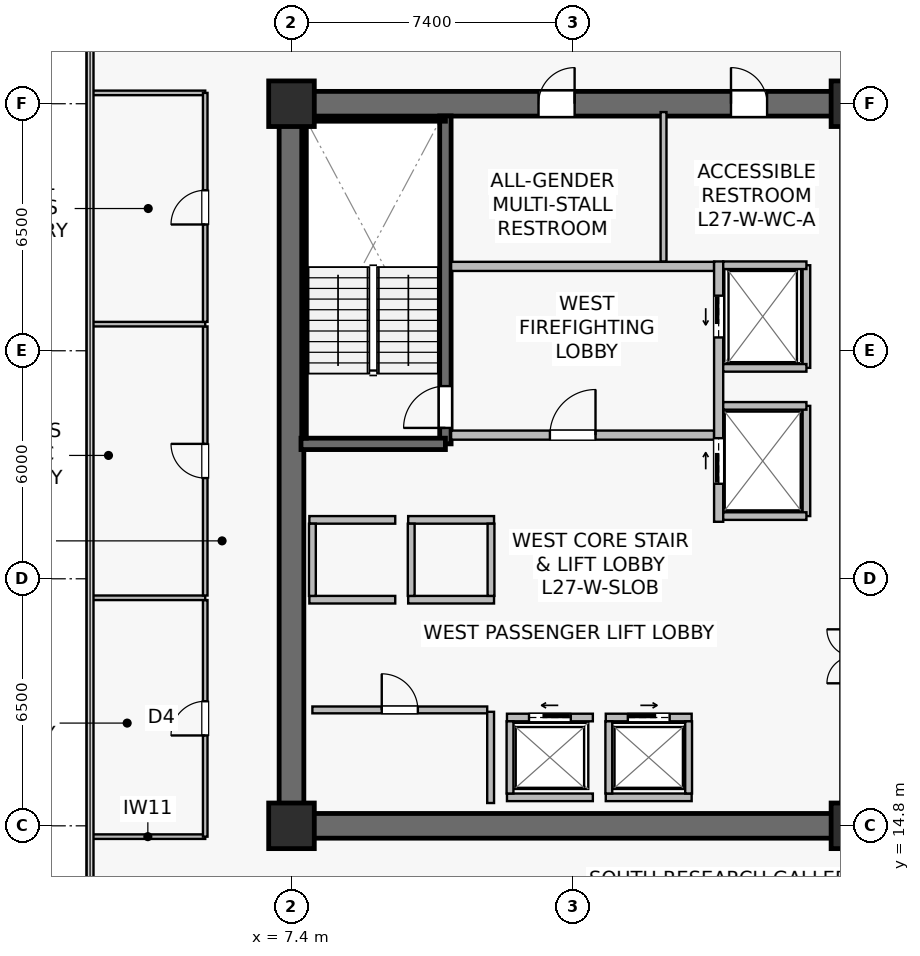
"""IFC4 building model, lengths in metres.
Left out: names, types, materials, properties, quantities, classifications, styles, units other than length and angle.
Written with IfcOpenShell. Run it as: python <this file> out.ifc"""

import sys

from ifc_helpers import new_model, si_unit, direction, frame, frame_2d, origin, origin_2d, place, context, subcontext, project, spatial, rectangle, extrude, source, transform, mapped, element, fill, save


model = new_model("IFC4")
c1 = context("Model", 3, precision=1e-05, world=origin(), true_north=direction((0.0, 1.0)))
c2 = subcontext(c1, "Body", "Model", "MODEL_VIEW")
j1 = project(units=[si_unit("LENGTHUNIT", "METRE"), si_unit("PLANEANGLEUNIT", "RADIAN")], contexts=[c1])
p1 = place(None, origin())
s1 = spatial("IfcSite", under=j1, at=p1, CompositionType="ELEMENT")
p2 = place(p1, origin())
s2 = spatial("IfcBuilding", under=s1, at=p2, CompositionType="ELEMENT")
p3 = place(p2, frame((0.0, 0.0, 113.3)))
s3 = spatial("IfcBuildingStorey", under=s2, at=p3, CompositionType="ELEMENT", Elevation=113.3)
p4 = place(p3, frame((7.075, 14.8, 0.0), z_axis=(0.0, 0.0, 1.0), x_axis=(1.0, 0.0, 0.0)))
e1 = element("IfcWall", 1, at=p4, inside=s3, PredefinedType="SHEAR", context=c2, shape_type="SweptSolid", body=[
    extrude(rectangle(XDim=15.45, YDim=0.65, at=frame_2d((7.725, 0.0))), origin(), (0.0, 0.0, 1.0), 3.79),
])
p5 = place(p3, frame((7.075, 33.8, 0.0), z_axis=(0.0, 0.0, 1.0), x_axis=(1.0, 0.0, 0.0)))
e2 = element("IfcWall", 2, at=p5, inside=s3, PredefinedType="SHEAR", context=c2, shape_type="SweptSolid", body=[
    extrude(rectangle(XDim=15.45, YDim=0.65, at=frame_2d((7.725, 0.0))), origin(), (0.0, 0.0, 1.0), 3.79),
])
p6 = place(p5, frame((6.825, 0.0, 0.0)))
e3 = element("IfcOpeningElement", 3, at=p6, cuts=e2, PredefinedType="OPENING", context=c2, shape_type="SweptSolid", body=[
    extrude(rectangle(XDim=0.95, YDim=2.15, at=frame_2d((0.475, 1.075))), frame((0.0, 0.335, 0.0), z_axis=(0.0, -1.0, 0.0), x_axis=(1.0, 0.0, 0.0)), (0.0, 0.0, 1.0), 0.67),
])
p7 = place(p5, frame((11.89, 0.0, 0.0)))
e4 = element("IfcOpeningElement", 4, at=p7, cuts=e2, PredefinedType="OPENING", context=c2, shape_type="SweptSolid", body=[
    extrude(rectangle(XDim=0.95, YDim=2.15, at=frame_2d((0.475, 1.075))), frame((0.0, 0.335, 0.0), z_axis=(0.0, -1.0, 0.0), x_axis=(1.0, 0.0, 0.0)), (0.0, 0.0, 1.0), 0.67),
])
p8 = place(p3, frame((7.4, 15.125, 0.0), z_axis=(0.0, 0.0, 1.0), x_axis=(0.0, 1.0, 0.0)))
e5 = element("IfcWall", 5, at=p8, inside=s3, PredefinedType="SHEAR", context=c2, shape_type="SweptSolid", body=[
    extrude(rectangle(XDim=18.35, YDim=0.65, at=frame_2d((9.175, 0.0))), origin(), (0.0, 0.0, 1.0), 3.79),
])
p9 = place(p3, frame((11.45, 24.85, 0.0), z_axis=(0.0, 0.0, 1.0), x_axis=(0.0, 1.0, 0.0)))
e6 = element("IfcWall", 6, at=p9, inside=s3, PredefinedType="SHEAR", context=c2, shape_type="SweptSolid", body=[
    extrude(rectangle(XDim=8.63, YDim=0.3, at=frame_2d((4.315, 0.0))), origin(), (0.0, 0.0, 1.0), 3.79),
])
p10 = place(p9, frame((0.42, 0.0, 0.0)))
e7 = element("IfcOpeningElement", 7, at=p10, cuts=e6, PredefinedType="OPENING", context=c2, shape_type="SweptSolid", body=[
    extrude(rectangle(XDim=1.1, YDim=2.15, at=frame_2d((0.55, 1.075))), frame((0.0, 0.16, 0.0), z_axis=(0.0, -1.0, 0.0), x_axis=(1.0, 0.0, 0.0)), (0.0, 0.0, 1.0), 0.32),
])
p11 = place(p3, frame((7.65, 24.85, 0.0), z_axis=(0.0, 0.0, 1.0), x_axis=(1.0, 0.0, 0.0)))
e8 = element("IfcWall", 8, at=p11, inside=s3, PredefinedType="SHEAR", context=c2, shape_type="SweptSolid", body=[
    extrude(rectangle(XDim=3.8, YDim=0.3, at=frame_2d((1.9, 0.0))), origin(), (0.0, 0.0, 1.0), 3.79),
])
p12 = place(p3, frame((7.73, 33.4, 0.0), z_axis=(0.0, 0.0, 1.0), x_axis=(1.0, 0.0, 0.0)))
e9 = element("IfcWall", 9, at=p12, inside=s3, PredefinedType="SOLIDWALL", context=c2, shape_type="SweptSolid", body=[
    extrude(rectangle(XDim=3.72, YDim=0.12, at=frame_2d((1.86, 0.0))), origin(), (0.0, 0.0, 1.0), 3.79),
])
p13 = place(p3, frame((7.73, 25.0, 0.0), z_axis=(0.0, 0.0, 1.0), x_axis=(0.0, 1.0, 0.0)))
e10 = element("IfcWall", 10, at=p13, inside=s3, PredefinedType="SOLIDWALL", context=c2, shape_type="SweptSolid", body=[
    extrude(rectangle(XDim=8.32, YDim=0.12, at=frame_2d((4.16, 0.0))), origin(), (0.0, 0.0, 1.0), 3.79),
])
m1 = source(origin(), c2, "Body", "SweptSolid", [
    extrude(rectangle(XDim=1.2, YDim=1.2, at=origin_2d()), origin(), (0.0, 0.0, 1.0), 4.1),
])
for number, where, z_axis, x_axis in (
    (11, (7.4, 14.8, 0.0), (0.0, 0.0, 1.0), (1.0, 0.0, 0.0)),
    (12, (22.2, 14.8, 0.0), (0.0, 0.0, 1.0), (1.0, 0.0, 0.0)),
    (13, (7.4, 33.8, 0.0), (0.0, 0.0, 1.0), (1.0, 0.0, 0.0)),
    (14, (22.2, 33.8, 0.0), (0.0, 0.0, 1.0), (1.0, 0.0, 0.0)),
):
    element("IfcColumn", number, at=place(p3, frame(where, z_axis=z_axis, x_axis=x_axis)), inside=s3, PredefinedType="COLUMN", context=c2, shape_type="MappedRepresentation", body=[
        mapped(m1, transform((0.0, 0.0, 0.0), scale=1.0)),
    ])
p14 = place(p3, frame((11.6, 25.08, 0.0), z_axis=(0.0, 0.0, 1.0), x_axis=(1.0, 0.0, 0.0)))
e15 = element("IfcWall", 15, at=p14, inside=s3, PredefinedType="SOLIDWALL", context=c2, shape_type="SweptSolid", body=[
    extrude(rectangle(XDim=6.92, YDim=0.24, at=frame_2d((3.46, 0.0))), origin(), (0.0, 0.0, 1.0), 3.125),
])
p15 = place(p14, frame((2.6, 0.0, 0.0)))
e16 = element("IfcOpeningElement", 16, at=p15, cuts=e15, PredefinedType="OPENING", context=c2, shape_type="SweptSolid", body=[
    extrude(rectangle(XDim=1.2, YDim=2.16, at=frame_2d((0.6, 1.08))), frame((0.0, 0.13, 0.0), z_axis=(0.0, -1.0, 0.0), x_axis=(1.0, 0.0, 0.0)), (0.0, 0.0, 1.0), 0.26),
])
p16 = place(p3, frame((11.6, 29.52, 0.0), z_axis=(0.0, 0.0, 1.0), x_axis=(1.0, 0.0, 0.0)))
e17 = element("IfcWall", 17, at=p16, inside=s3, PredefinedType="SOLIDWALL", context=c2, shape_type="SweptSolid", body=[
    extrude(rectangle(XDim=6.92, YDim=0.24, at=frame_2d((3.46, 0.0))), origin(), (0.0, 0.0, 1.0), 3.125),
])
p17 = place(p3, frame((18.64, 22.8, 0.0), z_axis=(0.0, 0.0, 1.0), x_axis=(0.0, 1.0, 0.0)))
e18 = element("IfcWall", 18, at=p17, inside=s3, PredefinedType="SOLIDWALL", context=c2, shape_type="SweptSolid", body=[
    extrude(rectangle(XDim=6.85, YDim=0.24, at=frame_2d((3.425, 0.0))), origin(), (0.0, 0.0, 1.0), 2.875),
])
p18 = place(p17, frame((4.85, 0.0, 0.0)))
e19 = element("IfcOpeningElement", 19, at=p18, cuts=e18, PredefinedType="OPENING", context=c2, shape_type="SweptSolid", body=[
    extrude(rectangle(XDim=1.1, YDim=2.22, at=frame_2d((0.55, 1.11))), frame((0.0, 0.13, 0.0), z_axis=(0.0, -1.0, 0.0), x_axis=(1.0, 0.0, 0.0)), (0.0, 0.0, 1.0), 0.26),
])
p19 = place(p17, frame((1.0, 0.0, 0.0)))
e20 = element("IfcOpeningElement", 20, at=p19, cuts=e18, PredefinedType="OPENING", context=c2, shape_type="SweptSolid", body=[
    extrude(rectangle(XDim=1.2, YDim=2.22, at=frame_2d((0.6, 1.11))), frame((0.0, 0.13, 0.0), z_axis=(0.0, -1.0, 0.0), x_axis=(1.0, 0.0, 0.0)), (0.0, 0.0, 1.0), 0.26),
])
p20 = place(p3, frame((13.07, 17.65, 0.0), z_axis=(0.0, 0.0, 1.0), x_axis=(1.0, 0.0, 0.0)))
e21 = element("IfcWall", 21, at=p20, inside=s3, PredefinedType="SOLIDWALL", context=c2, shape_type="SweptSolid", body=[
    extrude(rectangle(XDim=2.26, YDim=0.2, at=frame_2d((1.13, 0.0))), origin(), (0.0, 0.0, 1.0), 3.125),
])
p21 = place(p20, frame((0.58, 0.0, 0.0)))
e22 = element("IfcOpeningElement", 22, at=p21, cuts=e21, PredefinedType="OPENING", context=c2, shape_type="SweptSolid", body=[
    extrude(rectangle(XDim=1.1, YDim=2.22, at=frame_2d((0.55, 1.11))), frame((0.0, 0.11, 0.0), z_axis=(0.0, -1.0, 0.0), x_axis=(1.0, 0.0, 0.0)), (0.0, 0.0, 1.0), 0.22),
])
p22 = place(p3, frame((13.07, 15.55, 0.0), z_axis=(0.0, 0.0, 1.0), x_axis=(1.0, 0.0, 0.0)))
e23 = element("IfcWall", 23, at=p22, inside=s3, PredefinedType="SOLIDWALL", context=c2, shape_type="SweptSolid", body=[
    extrude(rectangle(XDim=2.26, YDim=0.2, at=frame_2d((1.13, 0.0))), origin(), (0.0, 0.0, 1.0), 3.125),
])
p23 = place(p3, frame((13.15, 15.65, 0.0), z_axis=(0.0, 0.0, 1.0), x_axis=(0.0, 1.0, 0.0)))
e24 = element("IfcWall", 24, at=p23, inside=s3, PredefinedType="SOLIDWALL", context=c2, shape_type="SweptSolid", body=[
    extrude(rectangle(XDim=1.9, YDim=0.18, at=frame_2d((0.95, 0.0))), origin(), (0.0, 0.0, 1.0), 3.79),
])
p24 = place(p3, frame((15.67, 17.65, 0.0), z_axis=(0.0, 0.0, 1.0), x_axis=(1.0, 0.0, 0.0)))
e25 = element("IfcWall", 25, at=p24, inside=s3, PredefinedType="SOLIDWALL", context=c2, shape_type="SweptSolid", body=[
    extrude(rectangle(XDim=2.26, YDim=0.2, at=frame_2d((1.13, 0.0))), origin(), (0.0, 0.0, 1.0), 3.79),
])
p25 = place(p24, frame((0.58, 0.0, 0.0)))
e26 = element("IfcOpeningElement", 26, at=p25, cuts=e25, PredefinedType="OPENING", context=c2, shape_type="SweptSolid", body=[
    extrude(rectangle(XDim=1.1, YDim=2.22, at=frame_2d((0.55, 1.11))), frame((0.0, 0.11, 0.0), z_axis=(0.0, -1.0, 0.0), x_axis=(1.0, 0.0, 0.0)), (0.0, 0.0, 1.0), 0.22),
])
p26 = place(p3, frame((15.67, 15.55, 0.0), z_axis=(0.0, 0.0, 1.0), x_axis=(1.0, 0.0, 0.0)))
e27 = element("IfcWall", 27, at=p26, inside=s3, PredefinedType="SOLIDWALL", context=c2, shape_type="SweptSolid", body=[
    extrude(rectangle(XDim=2.26, YDim=0.2, at=frame_2d((1.13, 0.0))), origin(), (0.0, 0.0, 1.0), 3.79),
])
for number, where, z_axis, x_axis in (
    (28, (15.75, 15.65, 0.0), (0.0, 0.0, 1.0), (0.0, 1.0, 0.0)),
    (29, (17.85, 15.65, 0.0), (0.0, 0.0, 1.0), (0.0, 1.0, 0.0)),
):
    element("IfcWall", number, at=place(p3, frame(where, z_axis=z_axis, x_axis=x_axis)), inside=s3, PredefinedType="SOLIDWALL", context=c2, shape_type="SweptSolid", body=[
        extrude(rectangle(XDim=1.9, YDim=0.18, at=frame_2d((0.95, 0.0))), origin(), (0.0, 0.0, 1.0), 3.79),
    ])
for number, where, z_axis, x_axis in (
    (30, (7.87, 20.75, 0.0), (0.0, 0.0, 1.0), (1.0, 0.0, 0.0)),
    (31, (7.87, 22.85, 0.0), (0.0, 0.0, 1.0), (1.0, 0.0, 0.0)),
):
    element("IfcWall", number, at=place(p3, frame(where, z_axis=z_axis, x_axis=x_axis)), inside=s3, PredefinedType="SOLIDWALL", context=c2, shape_type="SweptSolid", body=[
        extrude(rectangle(XDim=2.26, YDim=0.2, at=frame_2d((1.13, 0.0))), origin(), (0.0, 0.0, 1.0), 3.79),
    ])
p27 = place(p3, frame((7.95, 20.85, 0.0), z_axis=(0.0, 0.0, 1.0), x_axis=(0.0, 1.0, 0.0)))
e32 = element("IfcWall", 32, at=p27, inside=s3, PredefinedType="SOLIDWALL", context=c2, shape_type="SweptSolid", body=[
    extrude(rectangle(XDim=1.9, YDim=0.18, at=frame_2d((0.95, 0.0))), origin(), (0.0, 0.0, 1.0), 3.79),
])
for number, where, z_axis, x_axis in (
    (33, (10.47, 20.75, 0.0), (0.0, 0.0, 1.0), (1.0, 0.0, 0.0)),
    (34, (10.47, 22.85, 0.0), (0.0, 0.0, 1.0), (1.0, 0.0, 0.0)),
):
    element("IfcWall", number, at=place(p3, frame(where, z_axis=z_axis, x_axis=x_axis)), inside=s3, PredefinedType="SOLIDWALL", context=c2, shape_type="SweptSolid", body=[
        extrude(rectangle(XDim=2.26, YDim=0.2, at=frame_2d((1.13, 0.0))), origin(), (0.0, 0.0, 1.0), 3.79),
    ])
for number, where, z_axis, x_axis in (
    (35, (10.55, 20.85, 0.0), (0.0, 0.0, 1.0), (0.0, 1.0, 0.0)),
    (36, (12.65, 20.85, 0.0), (0.0, 0.0, 1.0), (0.0, 1.0, 0.0)),
):
    element("IfcWall", number, at=place(p3, frame(where, z_axis=z_axis, x_axis=x_axis)), inside=s3, PredefinedType="SOLIDWALL", context=c2, shape_type="SweptSolid", body=[
        extrude(rectangle(XDim=1.9, YDim=0.18, at=frame_2d((0.95, 0.0))), origin(), (0.0, 0.0, 1.0), 3.79),
    ])
p28 = place(p3, frame((20.95, 26.85, 0.0), z_axis=(0.0, 0.0, 1.0), x_axis=(0.0, 1.0, 0.0)))
e37 = element("IfcWall", 37, at=p28, inside=s3, PredefinedType="SOLIDWALL", context=c2, shape_type="SweptSolid", body=[
    extrude(rectangle(XDim=2.7, YDim=0.2, at=frame_2d((1.35, 0.0))), origin(), (0.0, 0.0, 1.0), 3.79),
])
p29 = place(p3, frame((18.76, 29.55, 0.0), z_axis=(0.0, 0.0, 1.0), x_axis=(1.0, 0.0, 0.0)))
e38 = element("IfcWall", 38, at=p29, inside=s3, PredefinedType="SOLIDWALL", context=c2, shape_type="SweptSolid", body=[
    extrude(rectangle(XDim=2.19, YDim=0.2, at=frame_2d((1.095, 0.0))), origin(), (0.0, 0.0, 1.0), 3.79),
])
p30 = place(p3, frame((18.76, 26.85, 0.0), z_axis=(0.0, 0.0, 1.0), x_axis=(1.0, 0.0, 0.0)))
e39 = element("IfcWall", 39, at=p30, inside=s3, PredefinedType="SOLIDWALL", context=c2, shape_type="SweptSolid", body=[
    extrude(rectangle(XDim=2.19, YDim=0.2, at=frame_2d((1.095, 0.0))), origin(), (0.0, 0.0, 1.0), 3.187),
])
p31 = place(p3, frame((20.95, 22.95, 0.0), z_axis=(0.0, 0.0, 1.0), x_axis=(0.0, 1.0, 0.0)))
e40 = element("IfcWall", 40, at=p31, inside=s3, PredefinedType="SOLIDWALL", context=c2, shape_type="SweptSolid", body=[
    extrude(rectangle(XDim=2.9, YDim=0.2, at=frame_2d((1.45, 0.0))), origin(), (0.0, 0.0, 1.0), 2.875),
])
for number, where, z_axis, x_axis in (
    (41, (18.76, 25.85, 0.0), (0.0, 0.0, 1.0), (1.0, 0.0, 0.0)),
    (42, (18.76, 22.95, 0.0), (0.0, 0.0, 1.0), (1.0, 0.0, 0.0)),
):
    element("IfcWall", number, at=place(p3, frame(where, z_axis=z_axis, x_axis=x_axis)), inside=s3, PredefinedType="SOLIDWALL", context=c2, shape_type="SweptSolid", body=[
        extrude(rectangle(XDim=2.19, YDim=0.2, at=frame_2d((1.095, 0.0))), origin(), (0.0, 0.0, 1.0), 3.79),
    ])
p32 = place(p3, frame((7.95, 17.85, 0.0), z_axis=(0.0, 0.0, 1.0), x_axis=(1.0, 0.0, 0.0)))
e43 = element("IfcWall", 43, at=p32, inside=s3, PredefinedType="SOLIDWALL", context=c2, shape_type="SweptSolid", body=[
    extrude(rectangle(XDim=4.6, YDim=0.18, at=frame_2d((2.3, 0.0))), origin(), (0.0, 0.0, 1.0), 3.79),
])
p33 = place(p32, frame((1.825, 0.0, 0.0)))
e44 = element("IfcOpeningElement", 44, at=p33, cuts=e43, PredefinedType="OPENING", context=c2, shape_type="SweptSolid", body=[
    extrude(rectangle(XDim=0.95, YDim=2.15, at=frame_2d((0.475, 1.075))), frame((0.0, 0.1, 0.0), z_axis=(0.0, -1.0, 0.0), x_axis=(1.0, 0.0, 0.0)), (0.0, 0.0, 1.0), 0.2),
])
p34 = place(p3, frame((12.64, 15.4, 0.0), z_axis=(0.0, 0.0, 1.0), x_axis=(0.0, 1.0, 0.0)))
e45 = element("IfcWall", 45, at=p34, inside=s3, PredefinedType="SOLIDWALL", context=c2, shape_type="SweptSolid", body=[
    extrude(rectangle(XDim=2.4, YDim=0.18, at=frame_2d((1.2, 0.0))), origin(), (0.0, 0.0, 1.0), 3.79),
])
p35 = place(p3, frame((17.19, 29.65, 0.0), z_axis=(0.0, 0.0, 1.0), x_axis=(0.0, 1.0, 0.0)))
e46 = element("IfcWall", 46, at=p35, inside=s3, PredefinedType="PLUMBINGWALL", context=c2, shape_type="SweptSolid", body=[
    extrude(rectangle(XDim=3.93, YDim=0.155, at=frame_2d((1.965, 0.0))), origin(), (0.0, 0.0, 1.0), 3.79),
])
for number, where, z_axis, x_axis in (
    (47, (2.11, 14.515, 0.0), (0.0, 0.0, 1.0), (1.0, 0.0, 0.0)),
    (48, (2.11, 34.085, 0.0), (0.0, 0.0, 1.0), (1.0, 0.0, 0.0)),
):
    element("IfcWall", number, at=place(p3, frame(where, z_axis=z_axis, x_axis=x_axis)), inside=s3, PredefinedType="PARTITIONING", context=c2, shape_type="SweptSolid", body=[
        extrude(rectangle(XDim=3.02, YDim=0.12, at=frame_2d((1.51, 0.0))), origin(), (0.0, 0.0, 1.0), 3.79),
    ])
p36 = place(p3, frame((5.13, 14.515, 0.0), z_axis=(0.0, 0.0, 1.0), x_axis=(0.0, 1.0, 0.0)))
e49 = element("IfcWall", 49, at=p36, inside=s3, PredefinedType="PARTITIONING", context=c2, shape_type="SweptSolid", body=[
    extrude(rectangle(XDim=6.225, YDim=0.12, at=frame_2d((3.113, 0.0))), origin(), (0.0, 0.0, 1.0), 3.79),
])
p37 = place(p36, frame((2.663, 0.0, 0.0)))
e50 = element("IfcOpeningElement", 50, at=p37, cuts=e49, PredefinedType="OPENING", context=c2, shape_type="SweptSolid", body=[
    extrude(rectangle(XDim=0.9, YDim=2.1, at=frame_2d((0.45, 1.05))), frame((0.0, 0.07, 0.0), z_axis=(0.0, -1.0, 0.0), x_axis=(1.0, 0.0, 0.0)), (0.0, 0.0, 1.0), 0.14),
])
p38 = place(p3, frame((2.11, 20.8, 0.0), z_axis=(0.0, 0.0, 1.0), x_axis=(1.0, 0.0, 0.0)))
e51 = element("IfcWall", 51, at=p38, inside=s3, PredefinedType="PARTITIONING", context=c2, shape_type="SweptSolid", body=[
    extrude(rectangle(XDim=3.02, YDim=0.12, at=frame_2d((1.51, 0.0))), origin(), (0.0, 0.0, 1.0), 3.79),
])
p39 = place(p3, frame((5.13, 20.86, 0.0), z_axis=(0.0, 0.0, 1.0), x_axis=(0.0, 1.0, 0.0)))
e52 = element("IfcWall", 52, at=p39, inside=s3, PredefinedType="PARTITIONING", context=c2, shape_type="SweptSolid", body=[
    extrude(rectangle(XDim=7.08, YDim=0.12, at=frame_2d((3.54, 0.0))), origin(), (0.0, 0.0, 1.0), 3.79),
])
p40 = place(p39, frame((3.09, 0.0, 0.0)))
e53 = element("IfcOpeningElement", 53, at=p40, cuts=e52, PredefinedType="OPENING", context=c2, shape_type="SweptSolid", body=[
    extrude(rectangle(XDim=0.9, YDim=2.1, at=frame_2d((0.45, 1.05))), frame((0.0, 0.07, 0.0), z_axis=(0.0, -1.0, 0.0), x_axis=(1.0, 0.0, 0.0)), (0.0, 0.0, 1.0), 0.14),
])
p41 = place(p3, frame((2.11, 28.0, 0.0), z_axis=(0.0, 0.0, 1.0), x_axis=(1.0, 0.0, 0.0)))
e54 = element("IfcWall", 54, at=p41, inside=s3, PredefinedType="PARTITIONING", context=c2, shape_type="SweptSolid", body=[
    extrude(rectangle(XDim=3.02, YDim=0.12, at=frame_2d((1.51, 0.0))), origin(), (0.0, 0.0, 1.0), 3.79),
])
p42 = place(p3, frame((5.13, 28.06, 0.0), z_axis=(0.0, 0.0, 1.0), x_axis=(0.0, 1.0, 0.0)))
e55 = element("IfcWall", 55, at=p42, inside=s3, PredefinedType="PARTITIONING", context=c2, shape_type="SweptSolid", body=[
    extrude(rectangle(XDim=6.025, YDim=0.12, at=frame_2d((3.012, 0.0))), origin(), (0.0, 0.0, 1.0), 3.79),
])
p43 = place(p42, frame((2.562, 0.0, 0.0)))
e56 = element("IfcOpeningElement", 56, at=p43, cuts=e55, PredefinedType="OPENING", context=c2, shape_type="SweptSolid", body=[
    extrude(rectangle(XDim=0.9, YDim=2.1, at=frame_2d((0.45, 1.05))), frame((0.0, 0.07, 0.0), z_axis=(0.0, -1.0, 0.0), x_axis=(1.0, 0.0, 0.0)), (0.0, 0.0, 1.0), 0.14),
])
m2 = source(origin(), c2, "Body", "SweptSolid", [
    extrude(rectangle(XDim=1.1, YDim=2.15, at=frame_2d((0.55, 1.075))), frame((0.0, 0.025, 0.0), z_axis=(0.0, -1.0, 0.0), x_axis=(1.0, 0.0, 0.0)), (0.0, 0.0, 1.0), 0.05),
])
p44 = place(p10, origin())
e57 = element("IfcDoor", 57, at=p44, inside=s3, OperationType="SINGLE_SWING_LEFT", PredefinedType="DOOR", context=c2, shape_type="MappedRepresentation", body=[
    mapped(m2, transform((0.0, 0.0, 0.0), scale=1.0)),
])
fill(e7, e57)
m3 = source(origin(), c2, "Body", "SweptSolid", [
    extrude(rectangle(XDim=1.2, YDim=2.16, at=frame_2d((0.6, 1.08))), frame((0.0, 0.025, 0.0), z_axis=(0.0, -1.0, 0.0), x_axis=(1.0, 0.0, 0.0)), (0.0, 0.0, 1.0), 0.05),
])
p45 = place(p15, origin())
e58 = element("IfcDoor", 58, at=p45, inside=s3, OperationType="SINGLE_SWING_RIGHT", PredefinedType="DOOR", context=c2, shape_type="MappedRepresentation", body=[
    mapped(m3, transform((0.0, 0.0, 0.0), scale=1.0)),
])
fill(e16, e58)
m4 = source(origin(), c2, "Body", "SweptSolid", [
    extrude(rectangle(XDim=1.1, YDim=2.22, at=frame_2d((0.55, 1.11))), frame((0.0, 0.025, 0.0), z_axis=(0.0, -1.0, 0.0), x_axis=(1.0, 0.0, 0.0)), (0.0, 0.0, 1.0), 0.05),
])
p46 = place(p21, origin())
e59 = element("IfcDoor", 59, at=p46, inside=s3, OperationType="SLIDING_TO_LEFT", PredefinedType="USERDEFINED", context=c2, shape_type="MappedRepresentation", body=[
    mapped(m4, transform((0.0, 0.0, 0.0), scale=1.0)),
])
fill(e22, e59)
p47 = place(p25, origin())
e60 = element("IfcDoor", 60, at=p47, inside=s3, OperationType="SLIDING_TO_RIGHT", PredefinedType="USERDEFINED", context=c2, shape_type="MappedRepresentation", body=[
    mapped(m4, transform((0.0, 0.0, 0.0), scale=1.0)),
])
fill(e26, e60)
p48 = place(p18, origin())
e61 = element("IfcDoor", 61, at=p48, inside=s3, OperationType="SLIDING_TO_LEFT", PredefinedType="USERDEFINED", context=c2, shape_type="MappedRepresentation", body=[
    mapped(m4, transform((0.0, 0.0, 0.0), scale=1.0)),
])
fill(e19, e61)
m5 = source(origin(), c2, "Body", "SweptSolid", [
    extrude(rectangle(XDim=1.2, YDim=2.22, at=frame_2d((0.6, 1.11))), frame((0.0, 0.025, 0.0), z_axis=(0.0, -1.0, 0.0), x_axis=(1.0, 0.0, 0.0)), (0.0, 0.0, 1.0), 0.05),
])
p49 = place(p19, origin())
e62 = element("IfcDoor", 62, at=p49, inside=s3, OperationType="SLIDING_TO_RIGHT", PredefinedType="USERDEFINED", context=c2, shape_type="MappedRepresentation", body=[
    mapped(m5, transform((0.0, 0.0, 0.0), scale=1.0)),
])
fill(e20, e62)
m6 = source(origin(), c2, "Body", "SweptSolid", [
    extrude(rectangle(XDim=0.95, YDim=2.15, at=frame_2d((0.475, 1.075))), frame((0.0, 0.025, 0.0), z_axis=(0.0, -1.0, 0.0), x_axis=(1.0, 0.0, 0.0)), (0.0, 0.0, 1.0), 0.05),
])
p50 = place(p33, origin())
e63 = element("IfcDoor", 63, at=p50, inside=s3, OperationType="SINGLE_SWING_LEFT", PredefinedType="DOOR", context=c2, shape_type="MappedRepresentation", body=[
    mapped(m6, transform((0.0, 0.0, 0.0), scale=1.0)),
])
fill(e44, e63)
p51 = place(p6, origin())
e64 = element("IfcDoor", 64, at=p51, inside=s3, OperationType="SINGLE_SWING_RIGHT", PredefinedType="DOOR", context=c2, shape_type="MappedRepresentation", body=[
    mapped(m6, transform((0.0, 0.0, 0.0), scale=1.0)),
])
fill(e3, e64)
p52 = place(p7, origin())
e65 = element("IfcDoor", 65, at=p52, inside=s3, OperationType="SINGLE_SWING_LEFT", PredefinedType="DOOR", context=c2, shape_type="MappedRepresentation", body=[
    mapped(m6, transform((0.0, 0.0, 0.0), scale=1.0)),
])
fill(e4, e65)
m7 = source(origin(), c2, "Body", "SweptSolid", [
    extrude(rectangle(XDim=0.9, YDim=2.1, at=frame_2d((0.45, 1.05))), frame((0.0, 0.025, 0.0), z_axis=(0.0, -1.0, 0.0), x_axis=(1.0, 0.0, 0.0)), (0.0, 0.0, 1.0), 0.05),
])
p53 = place(p37, origin())
e66 = element("IfcDoor", 66, at=p53, inside=s3, OperationType="SINGLE_SWING_LEFT", PredefinedType="DOOR", context=c2, shape_type="MappedRepresentation", body=[
    mapped(m7, transform((0.0, 0.0, 0.0), scale=1.0)),
])
fill(e50, e66)
p54 = place(p40, origin())
e67 = element("IfcDoor", 67, at=p54, inside=s3, OperationType="SINGLE_SWING_RIGHT", PredefinedType="DOOR", context=c2, shape_type="MappedRepresentation", body=[
    mapped(m7, transform((0.0, 0.0, 0.0), scale=1.0)),
])
fill(e53, e67)
p55 = place(p43, origin())
e68 = element("IfcDoor", 68, at=p55, inside=s3, OperationType="SINGLE_SWING_LEFT", PredefinedType="DOOR", context=c2, shape_type="MappedRepresentation", body=[
    mapped(m7, transform((0.0, 0.0, 0.0), scale=1.0)),
])
fill(e56, e68)
save(model, sys.argv[1])
